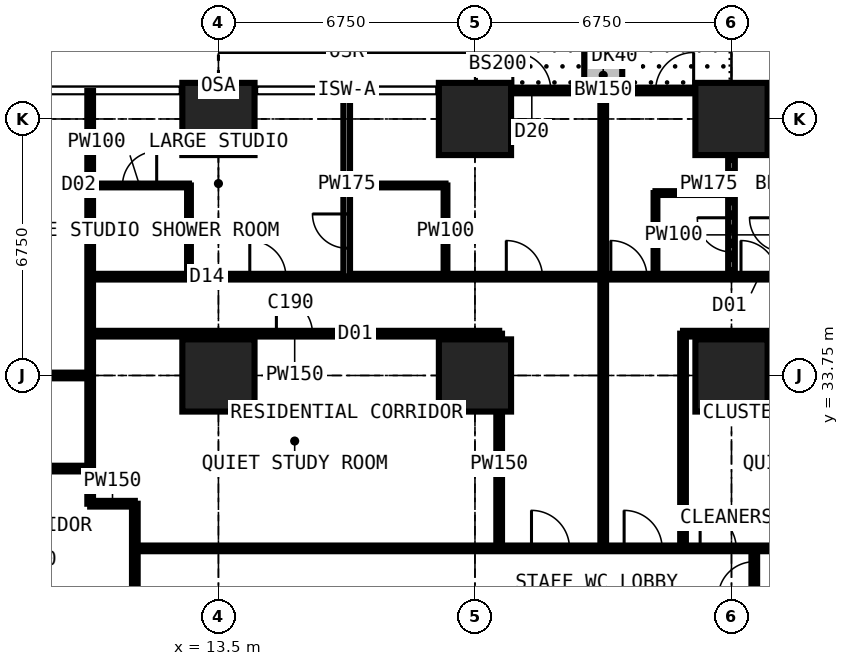
"""IFC4 building model, lengths in metres.
Left out: names, types, materials, properties, quantities, classifications, styles, units other than length and angle.
Written with IfcOpenShell. Run it as: python <this file> out.ifc"""

import sys

from ifc_helpers import new_model, si_unit, direction, frame, frame_2d, origin, origin_2d, place, context, subcontext, project, spatial, rectangle, extrude, element, fill, save


model = new_model("IFC4")
c1 = context("Model", 3, precision=1e-05, world=origin(), true_north=direction((0.0, 1.0)))
c2 = subcontext(c1, "Body", "Model", "MODEL_VIEW")
j1 = project(units=[si_unit("LENGTHUNIT", "METRE"), si_unit("PLANEANGLEUNIT", "RADIAN")], contexts=[c1])
p1 = place(None, origin())
s1 = spatial("IfcSite", under=j1, at=p1, CompositionType="ELEMENT")
p2 = place(p1, origin())
s2 = spatial("IfcBuilding", under=s1, at=p2, CompositionType="ELEMENT")
p3 = place(p2, frame((0.0, 0.0, 43.2)))
s3 = spatial("IfcBuildingStorey", under=s2, at=p3, CompositionType="ELEMENT", Elevation=43.2)
for number, where, z_axis, x_axis in (
    (1, (13.5, 33.75, 0.0), (0.0, 0.0, 1.0), (1.0, 0.0, 0.0)),
    (2, (13.5, 40.5, 0.0), (0.0, 0.0, 1.0), (1.0, 0.0, 0.0)),
    (3, (20.25, 33.75, 0.0), (0.0, 0.0, 1.0), (1.0, 0.0, 0.0)),
    (4, (20.25, 40.5, 0.0), (0.0, 0.0, 1.0), (1.0, 0.0, 0.0)),
    (5, (27.0, 33.75, 0.0), (0.0, 0.0, 1.0), (1.0, 0.0, 0.0)),
    (6, (27.0, 40.5, 0.0), (0.0, 0.0, 1.0), (1.0, 0.0, 0.0)),
):
    element("IfcColumn", number, at=place(p3, frame(where, z_axis=z_axis, x_axis=x_axis)), inside=s3, PredefinedType="COLUMN", context=c2, shape_type="SweptSolid", body=[
        extrude(rectangle(XDim=1.9, YDim=1.9, at=origin_2d()), origin(), (0.0, 0.0, 1.0), 3.6),
    ])
p4 = place(p3, frame((20.25, 41.25, 0.0), z_axis=(0.0, 0.0, 1.0), x_axis=(1.0, 0.0, 0.0)))
e7 = element("IfcWall", 7, at=p4, inside=s3, PredefinedType="SOLIDWALL", context=c2, shape_type="SweptSolid", body=[
    extrude(rectangle(XDim=6.75, YDim=0.15, at=frame_2d((3.375, 0.0))), origin(), (0.0, 0.0, 1.0), 3.375),
])
p5 = place(p4, frame((0.996, 0.0, 0.0)))
e8 = element("IfcOpeningElement", 8, at=p5, cuts=e7, PredefinedType="OPENING", context=c2, shape_type="SweptSolid", body=[
    extrude(rectangle(XDim=1.0, YDim=2.2, at=frame_2d((0.5, 1.1))), frame((0.0, 0.085, 0.0), z_axis=(0.0, -1.0, 0.0), x_axis=(1.0, 0.0, 0.0)), (0.0, 0.0, 1.0), 0.17),
])
p6 = place(p4, frame((2.042, 0.0, 0.9)))
e9 = element("IfcOpeningElement", 9, at=p6, cuts=e7, PredefinedType="OPENING", context=c2, shape_type="SweptSolid", body=[
    extrude(rectangle(XDim=1.2, YDim=1.8, at=frame_2d((0.6, 0.9))), frame((0.0, 0.085, 0.0), z_axis=(0.0, -1.0, 0.0), x_axis=(1.0, 0.0, 0.0)), (0.0, 0.0, 1.0), 0.17),
])
p7 = place(p4, frame((4.754, 0.0, 0.0)))
e10 = element("IfcOpeningElement", 10, at=p7, cuts=e7, PredefinedType="OPENING", context=c2, shape_type="SweptSolid", body=[
    extrude(rectangle(XDim=1.0, YDim=2.2, at=frame_2d((0.5, 1.1))), frame((0.0, 0.085, 0.0), z_axis=(0.0, -1.0, 0.0), x_axis=(1.0, 0.0, 0.0)), (0.0, 0.0, 1.0), 0.17),
])
p8 = place(p4, frame((3.508, 0.0, 0.9)))
e11 = element("IfcOpeningElement", 11, at=p8, cuts=e7, PredefinedType="OPENING", context=c2, shape_type="SweptSolid", body=[
    extrude(rectangle(XDim=1.2, YDim=1.8, at=frame_2d((0.6, 0.9))), frame((0.0, 0.085, 0.0), z_axis=(0.0, -1.0, 0.0), x_axis=(1.0, 0.0, 0.0)), (0.0, 0.0, 1.0), 0.17),
])
p9 = place(p3, frame((23.625, 41.35, 0.0), z_axis=(0.0, 0.0, 1.0), x_axis=(0.0, 1.0, 0.0)))
e12 = element("IfcWall", 12, at=p9, inside=s3, PredefinedType="USERDEFINED", context=c2, shape_type="SweptSolid", body=[
    extrude(rectangle(XDim=2.2, YDim=1.0, at=frame_2d((1.1, 0.0))), origin(), (0.0, 0.0, 1.0), 0.9),
])
p10 = place(p3, frame((-0.734, 33.75, 0.0), z_axis=(0.0, 0.0, 1.0), x_axis=(1.0, 0.0, 0.0)))
e13 = element("IfcWall", 13, at=p10, inside=s3, PredefinedType="PARTITIONING", context=c2, shape_type="SweptSolid", body=[
    extrude(rectangle(XDim=10.859, YDim=0.15, at=frame_2d((5.429, 0.0))), origin(), (0.0, 0.0, 1.0), 2.877),
])
p11 = place(p10, frame((8.434, 0.0, 0.0)))
e14 = element("IfcOpeningElement", 14, at=p11, cuts=e13, PredefinedType="OPENING", context=c2, shape_type="SweptSolid", body=[
    extrude(rectangle(XDim=1.0, YDim=2.2, at=frame_2d((0.5, 1.1))), frame((0.0, 0.085, 0.0), z_axis=(0.0, -1.0, 0.0), x_axis=(1.0, 0.0, 0.0)), (0.0, 0.0, 1.0), 0.17),
])
p12 = place(p3, frame((5.65, 31.3, 0.0), z_axis=(0.0, 0.0, 1.0), x_axis=(1.0, 0.0, 0.0)))
e15 = element("IfcWall", 15, at=p12, inside=s3, PredefinedType="PARTITIONING", context=c2, shape_type="SweptSolid", body=[
    extrude(rectangle(XDim=4.475, YDim=0.15, at=frame_2d((2.238, 0.0))), origin(), (0.0, 0.0, 1.0), 3.375),
])
p13 = place(p3, frame((10.125, 30.375, 0.0), z_axis=(0.0, 0.0, 1.0), x_axis=(0.0, 1.0, 0.0)))
e16 = element("IfcWall", 16, at=p13, inside=s3, PredefinedType="PARTITIONING", context=c2, shape_type="SweptSolid", body=[
    extrude(rectangle(XDim=10.859, YDim=0.15, at=frame_2d((5.429, 0.0))), origin(), (0.0, 0.0, 1.0), 3.375),
])
p14 = place(p3, frame((10.125, 30.375, 0.0), z_axis=(0.0, 0.0, 1.0), x_axis=(1.0, 0.0, 0.0)))
e17 = element("IfcWall", 17, at=p14, inside=s3, PredefinedType="PARTITIONING", context=c2, shape_type="SweptSolid", body=[
    extrude(rectangle(XDim=1.175, YDim=0.15, at=frame_2d((0.587, 0.0))), origin(), (0.0, 0.0, 1.0), 3.375),
])
p15 = place(p3, frame((10.125, 34.85, 0.0), z_axis=(0.0, 0.0, 1.0), x_axis=(1.0, 0.0, 0.0)))
e18 = element("IfcWall", 18, at=p15, inside=s3, PredefinedType="PARTITIONING", context=c2, shape_type="SweptSolid", body=[
    extrude(rectangle(XDim=10.762, YDim=0.15, at=frame_2d((5.381, 0.0))), origin(), (0.0, 0.0, 1.0), 3.375),
])
p16 = place(p15, frame((4.9, 0.0, 0.0)))
e19 = element("IfcOpeningElement", 19, at=p16, cuts=e18, PredefinedType="OPENING", context=c2, shape_type="SweptSolid", body=[
    extrude(rectangle(XDim=0.95, YDim=2.2, at=frame_2d((0.475, 1.1))), frame((0.0, 0.085, 0.0), z_axis=(0.0, -1.0, 0.0), x_axis=(1.0, 0.0, 0.0)), (0.0, 0.0, 1.0), 0.17),
])
p17 = place(p3, frame((10.125, 36.35, 0.0), z_axis=(0.0, 0.0, 1.0), x_axis=(1.0, 0.0, 0.0)))
e20 = element("IfcWall", 20, at=p17, inside=s3, PredefinedType="PARTITIONING", context=c2, shape_type="SweptSolid", body=[
    extrude(rectangle(XDim=23.625, YDim=0.15, at=frame_2d((11.812, 0.0))), origin(), (0.0, 0.0, 1.0), 3.375),
])
p18 = place(p17, frame((21.45, 0.0, 0.0)))
e21 = element("IfcOpeningElement", 21, at=p18, cuts=e20, PredefinedType="OPENING", context=c2, shape_type="SweptSolid", body=[
    extrude(rectangle(XDim=1.0, YDim=2.2, at=frame_2d((0.5, 1.1))), frame((0.0, 0.085, 0.0), z_axis=(0.0, -1.0, 0.0), x_axis=(1.0, 0.0, 0.0)), (0.0, 0.0, 1.0), 0.17),
])
p19 = place(p17, frame((17.125, 0.0, 0.0)))
e22 = element("IfcOpeningElement", 22, at=p19, cuts=e20, PredefinedType="OPENING", context=c2, shape_type="SweptSolid", body=[
    extrude(rectangle(XDim=0.95, YDim=2.2, at=frame_2d((0.475, 1.1))), frame((0.0, 0.085, 0.0), z_axis=(0.0, -1.0, 0.0), x_axis=(1.0, 0.0, 0.0)), (0.0, 0.0, 1.0), 0.17),
])
p20 = place(p17, frame((13.7, 0.0, 0.0)))
e23 = element("IfcOpeningElement", 23, at=p20, cuts=e20, PredefinedType="OPENING", context=c2, shape_type="SweptSolid", body=[
    extrude(rectangle(XDim=0.95, YDim=2.2, at=frame_2d((0.475, 1.1))), frame((0.0, 0.085, 0.0), z_axis=(0.0, -1.0, 0.0), x_axis=(1.0, 0.0, 0.0)), (0.0, 0.0, 1.0), 0.17),
])
p21 = place(p17, frame((4.2, 0.0, 0.0)))
e24 = element("IfcOpeningElement", 24, at=p21, cuts=e20, PredefinedType="OPENING", context=c2, shape_type="SweptSolid", body=[
    extrude(rectangle(XDim=0.95, YDim=2.2, at=frame_2d((0.475, 1.1))), frame((0.0, 0.085, 0.0), z_axis=(0.0, -1.0, 0.0), x_axis=(1.0, 0.0, 0.0)), (0.0, 0.0, 1.0), 0.17),
])
p22 = place(p17, frame((10.95, 0.0, 0.0)))
e25 = element("IfcOpeningElement", 25, at=p22, cuts=e20, PredefinedType="OPENING", context=c2, shape_type="SweptSolid", body=[
    extrude(rectangle(XDim=0.95, YDim=2.2, at=frame_2d((0.475, 1.1))), frame((0.0, 0.085, 0.0), z_axis=(0.0, -1.0, 0.0), x_axis=(1.0, 0.0, 0.0)), (0.0, 0.0, 1.0), 0.17),
])
p23 = place(p3, frame((10.125, 38.75, 0.0), z_axis=(0.0, 0.0, 1.0), x_axis=(1.0, 0.0, 0.0)))
e26 = element("IfcWall", 26, at=p23, inside=s3, PredefinedType="PARTITIONING", context=c2, shape_type="SweptSolid", body=[
    extrude(rectangle(XDim=2.6, YDim=0.1, at=frame_2d((1.3, 0.0))), origin(), (0.0, 0.0, 1.0), 3.375),
])
p24 = place(p23, frame((0.85, 0.0, 0.0)))
e27 = element("IfcOpeningElement", 27, at=p24, cuts=e26, PredefinedType="OPENING", context=c2, shape_type="SweptSolid", body=[
    extrude(rectangle(XDim=0.9, YDim=2.2, at=frame_2d((0.45, 1.1))), frame((0.0, 0.06, 0.0), z_axis=(0.0, -1.0, 0.0), x_axis=(1.0, 0.0, 0.0)), (0.0, 0.0, 1.0), 0.12),
])
p25 = place(p3, frame((11.3, 11.3, 0.0), z_axis=(0.0, 0.0, 1.0), x_axis=(0.0, 1.0, 0.0)))
e28 = element("IfcWall", 28, at=p25, inside=s3, PredefinedType="PARTITIONING", context=c2, shape_type="SweptSolid", body=[
    extrude(rectangle(XDim=19.075, YDim=0.15, at=frame_2d((9.538, 0.0))), origin(), (0.0, 0.0, 1.0), 3.375),
])
p26 = place(p25, frame((12.875, 0.0, 0.0)))
e29 = element("IfcOpeningElement", 29, at=p26, cuts=e28, PredefinedType="OPENING", context=c2, shape_type="SweptSolid", body=[
    extrude(rectangle(XDim=1.0, YDim=2.2, at=frame_2d((0.5, 1.1))), frame((0.0, 0.085, 0.0), z_axis=(0.0, -1.0, 0.0), x_axis=(1.0, 0.0, 0.0)), (0.0, 0.0, 1.0), 0.17),
])
p27 = place(p25, frame((10.438, 0.0, 0.0)))
e30 = element("IfcOpeningElement", 30, at=p27, cuts=e28, PredefinedType="OPENING", context=c2, shape_type="SweptSolid", body=[
    extrude(rectangle(XDim=1.0, YDim=2.2, at=frame_2d((0.5, 1.1))), frame((0.0, 0.085, 0.0), z_axis=(0.0, -1.0, 0.0), x_axis=(1.0, 0.0, 0.0)), (0.0, 0.0, 1.0), 0.17),
])
p28 = place(p25, frame((15.675, 0.0, 0.0)))
e31 = element("IfcOpeningElement", 31, at=p28, cuts=e28, PredefinedType="OPENING", context=c2, shape_type="SweptSolid", body=[
    extrude(rectangle(XDim=0.95, YDim=2.2, at=frame_2d((0.475, 1.1))), frame((0.0, 0.085, 0.0), z_axis=(0.0, -1.0, 0.0), x_axis=(1.0, 0.0, 0.0)), (0.0, 0.0, 1.0), 0.17),
])
p29 = place(p3, frame((11.3, 29.2, 0.0), z_axis=(0.0, 0.0, 1.0), x_axis=(1.0, 0.0, 0.0)))
e32 = element("IfcWall", 32, at=p29, inside=s3, PredefinedType="PARTITIONING", context=c2, shape_type="SweptSolid", body=[
    extrude(rectangle(XDim=19.075, YDim=0.15, at=frame_2d((9.538, 0.0))), origin(), (0.0, 0.0, 1.0), 3.375),
])
p30 = place(p29, frame((12.875, 0.0, 0.0)))
e33 = element("IfcOpeningElement", 33, at=p30, cuts=e32, PredefinedType="OPENING", context=c2, shape_type="SweptSolid", body=[
    extrude(rectangle(XDim=1.0, YDim=2.2, at=frame_2d((0.5, 1.1))), frame((0.0, 0.085, 0.0), z_axis=(0.0, -1.0, 0.0), x_axis=(1.0, 0.0, 0.0)), (0.0, 0.0, 1.0), 0.17),
])
p31 = place(p29, frame((10.438, 0.0, 0.0)))
e34 = element("IfcOpeningElement", 34, at=p31, cuts=e32, PredefinedType="OPENING", context=c2, shape_type="SweptSolid", body=[
    extrude(rectangle(XDim=1.0, YDim=2.2, at=frame_2d((0.5, 1.1))), frame((0.0, 0.085, 0.0), z_axis=(0.0, -1.0, 0.0), x_axis=(1.0, 0.0, 0.0)), (0.0, 0.0, 1.0), 0.17),
])
p32 = place(p29, frame((14.875, 0.0, 0.0)))
e35 = element("IfcOpeningElement", 35, at=p32, cuts=e32, PredefinedType="OPENING", context=c2, shape_type="SweptSolid", body=[
    extrude(rectangle(XDim=0.95, YDim=2.2, at=frame_2d((0.475, 1.1))), frame((0.0, 0.085, 0.0), z_axis=(0.0, -1.0, 0.0), x_axis=(1.0, 0.0, 0.0)), (0.0, 0.0, 1.0), 0.17),
])
p33 = place(p3, frame((12.725, 36.35, 0.0), z_axis=(0.0, 0.0, 1.0), x_axis=(0.0, 1.0, 0.0)))
e36 = element("IfcWall", 36, at=p33, inside=s3, PredefinedType="PARTITIONING", context=c2, shape_type="SweptSolid", body=[
    extrude(rectangle(XDim=2.4, YDim=0.1, at=frame_2d((1.2, 0.0))), origin(), (0.0, 0.0, 1.0), 3.375),
])
p34 = place(p3, frame((16.875, 36.35, 0.0), z_axis=(0.0, 0.0, 1.0), x_axis=(0.0, 1.0, 0.0)))
e37 = element("IfcWall", 37, at=p34, inside=s3, PredefinedType="PARTITIONING", context=c2, shape_type="SweptSolid", body=[
    extrude(rectangle(XDim=4.884, YDim=0.175, at=frame_2d((2.442, 0.0))), origin(), (0.0, 0.0, 1.0), 3.375),
])
p35 = place(p34, frame((0.75, 0.0, 0.0)))
e38 = element("IfcOpeningElement", 38, at=p35, cuts=e37, PredefinedType="OPENING", context=c2, shape_type="SweptSolid", body=[
    extrude(rectangle(XDim=0.9, YDim=2.2, at=frame_2d((0.45, 1.1))), frame((0.0, 0.097, 0.0), z_axis=(0.0, -1.0, 0.0), x_axis=(1.0, 0.0, 0.0)), (0.0, 0.0, 1.0), 0.195),
])
p36 = place(p3, frame((16.875, 38.75, 0.0), z_axis=(0.0, 0.0, 1.0), x_axis=(1.0, 0.0, 0.0)))
e39 = element("IfcWall", 39, at=p36, inside=s3, PredefinedType="PARTITIONING", context=c2, shape_type="SweptSolid", body=[
    extrude(rectangle(XDim=2.6, YDim=0.1, at=frame_2d((1.3, 0.0))), origin(), (0.0, 0.0, 1.0), 3.375),
])
p37 = place(p3, frame((19.475, 36.35, 0.0), z_axis=(0.0, 0.0, 1.0), x_axis=(0.0, 1.0, 0.0)))
e40 = element("IfcWall", 40, at=p37, inside=s3, PredefinedType="PARTITIONING", context=c2, shape_type="SweptSolid", body=[
    extrude(rectangle(XDim=2.4, YDim=0.1, at=frame_2d((1.2, 0.0))), origin(), (0.0, 0.0, 1.0), 3.375),
])
p38 = place(p3, frame((20.887, 29.2, 0.0), z_axis=(0.0, 0.0, 1.0), x_axis=(0.0, 1.0, 0.0)))
e41 = element("IfcWall", 41, at=p38, inside=s3, PredefinedType="PARTITIONING", context=c2, shape_type="SweptSolid", body=[
    extrude(rectangle(XDim=5.65, YDim=0.15, at=frame_2d((2.825, 0.0))), origin(), (0.0, 0.0, 1.0), 3.375),
])
p39 = place(p3, frame((23.625, 29.2, 0.0), z_axis=(0.0, 0.0, 1.0), x_axis=(0.0, 1.0, 0.0)))
e42 = element("IfcWall", 42, at=p39, inside=s3, PredefinedType="PARTITIONING", context=c2, shape_type="SweptSolid", body=[
    extrude(rectangle(XDim=12.034, YDim=0.15, at=frame_2d((6.017, 0.0))), origin(), (0.0, 0.0, 1.0), 3.375),
])
p40 = place(p3, frame((25.0, 36.35, 0.0), z_axis=(0.0, 0.0, 1.0), x_axis=(0.0, 1.0, 0.0)))
e43 = element("IfcWall", 43, at=p40, inside=s3, PredefinedType="PARTITIONING", context=c2, shape_type="SweptSolid", body=[
    extrude(rectangle(XDim=2.2, YDim=0.1, at=frame_2d((1.1, 0.0))), origin(), (0.0, 0.0, 1.0), 3.375),
])
p41 = place(p3, frame((25.0, 38.55, 0.0), z_axis=(0.0, 0.0, 1.0), x_axis=(1.0, 0.0, 0.0)))
e44 = element("IfcWall", 44, at=p41, inside=s3, PredefinedType="PARTITIONING", context=c2, shape_type="SweptSolid", body=[
    extrude(rectangle(XDim=2.0, YDim=0.1, at=frame_2d((1.0, 0.0))), origin(), (0.0, 0.0, 1.0), 3.375),
])
p42 = place(p3, frame((25.725, 29.2, 0.0), z_axis=(0.0, 0.0, 1.0), x_axis=(0.0, 1.0, 0.0)))
e45 = element("IfcWall", 45, at=p42, inside=s3, PredefinedType="PARTITIONING", context=c2, shape_type="SweptSolid", body=[
    extrude(rectangle(XDim=5.65, YDim=0.15, at=frame_2d((2.825, 0.0))), origin(), (0.0, 0.0, 1.0), 3.375),
])
p43 = place(p3, frame((25.725, 34.85, 0.0), z_axis=(0.0, 0.0, 1.0), x_axis=(1.0, 0.0, 0.0)))
e46 = element("IfcWall", 46, at=p43, inside=s3, PredefinedType="PARTITIONING", context=c2, shape_type="SweptSolid", body=[
    extrude(rectangle(XDim=8.025, YDim=0.15, at=frame_2d((4.012, 0.0))), origin(), (0.0, 0.0, 1.0), 3.375),
])
p44 = place(p3, frame((27.0, 36.35, 0.0), z_axis=(0.0, 0.0, 1.0), x_axis=(0.0, 1.0, 0.0)))
e47 = element("IfcWall", 47, at=p44, inside=s3, PredefinedType="PARTITIONING", context=c2, shape_type="SweptSolid", body=[
    extrude(rectangle(XDim=4.884, YDim=0.175, at=frame_2d((2.442, 0.0))), origin(), (0.0, 0.0, 1.0), 2.61),
])
p45 = place(p44, frame((0.65, 0.0, 0.0)))
e48 = element("IfcOpeningElement", 48, at=p45, cuts=e47, PredefinedType="OPENING", context=c2, shape_type="SweptSolid", body=[
    extrude(rectangle(XDim=0.9, YDim=2.2, at=frame_2d((0.45, 1.1))), frame((0.0, 0.097, 0.0), z_axis=(0.0, -1.0, 0.0), x_axis=(1.0, 0.0, 0.0)), (0.0, 0.0, 1.0), 0.195),
])
p46 = place(p3, frame((27.6, 27.6, 0.0), z_axis=(0.0, 0.0, 1.0), x_axis=(0.0, 1.0, 0.0)))
e49 = element("IfcWall", 49, at=p46, inside=s3, PredefinedType="PARTITIONING", context=c2, shape_type="SweptSolid", body=[
    extrude(rectangle(XDim=1.6, YDim=0.15, at=frame_2d((0.8, 0.0))), origin(), (0.0, 0.0, 1.0), 3.375),
])
p47 = place(p46, frame((0.3, 0.0, 0.0)))
e50 = element("IfcOpeningElement", 50, at=p47, cuts=e49, PredefinedType="OPENING", context=c2, shape_type="SweptSolid", body=[
    extrude(rectangle(XDim=0.95, YDim=2.2, at=frame_2d((0.475, 1.1))), frame((0.0, 0.085, 0.0), z_axis=(0.0, -1.0, 0.0), x_axis=(1.0, 0.0, 0.0)), (0.0, 0.0, 1.0), 0.17),
])
p48 = place(p5, origin())
e51 = element("IfcDoor", 51, at=p48, inside=s3, OperationType="SINGLE_SWING_LEFT", PredefinedType="DOOR", context=c2, shape_type="SweptSolid", body=[
    extrude(rectangle(XDim=1.0, YDim=2.2, at=frame_2d((0.5, 1.1))), frame((0.0, 0.025, 0.0), z_axis=(0.0, -1.0, 0.0), x_axis=(1.0, 0.0, 0.0)), (0.0, 0.0, 1.0), 0.05),
])
fill(e8, e51)
p49 = place(p6, origin())
e52 = element("IfcWindow", 52, at=p49, inside=s3, PartitioningType="SINGLE_PANEL", PredefinedType="WINDOW", context=c2, shape_type="SweptSolid", body=[
    extrude(rectangle(XDim=1.2, YDim=1.8, at=frame_2d((0.6, 0.9))), frame((0.0, 0.03, 0.0), z_axis=(0.0, -1.0, 0.0), x_axis=(1.0, 0.0, 0.0)), (0.0, 0.0, 1.0), 0.06),
])
fill(e9, e52)
p50 = place(p7, origin())
e53 = element("IfcDoor", 53, at=p50, inside=s3, OperationType="SINGLE_SWING_RIGHT", PredefinedType="DOOR", context=c2, shape_type="SweptSolid", body=[
    extrude(rectangle(XDim=1.0, YDim=2.2, at=frame_2d((0.5, 1.1))), frame((0.0, 0.025, 0.0), z_axis=(0.0, -1.0, 0.0), x_axis=(1.0, 0.0, 0.0)), (0.0, 0.0, 1.0), 0.05),
])
fill(e10, e53)
p51 = place(p8, origin())
e54 = element("IfcWindow", 54, at=p51, inside=s3, PartitioningType="SINGLE_PANEL", PredefinedType="WINDOW", context=c2, shape_type="SweptSolid", body=[
    extrude(rectangle(XDim=1.2, YDim=1.8, at=frame_2d((0.6, 0.9))), frame((0.0, 0.03, 0.0), z_axis=(0.0, -1.0, 0.0), x_axis=(1.0, 0.0, 0.0)), (0.0, 0.0, 1.0), 0.06),
])
fill(e11, e54)
p52 = place(p47, origin())
e55 = element("IfcDoor", 55, at=p52, inside=s3, OperationType="SINGLE_SWING_LEFT", PredefinedType="DOOR", context=c2, shape_type="SweptSolid", body=[
    extrude(rectangle(XDim=0.95, YDim=2.2, at=frame_2d((0.475, 1.1))), frame((0.0, 0.025, 0.0), z_axis=(0.0, -1.0, 0.0), x_axis=(1.0, 0.0, 0.0)), (0.0, 0.0, 1.0), 0.05),
])
fill(e50, e55)
p53 = place(p19, origin())
e56 = element("IfcDoor", 56, at=p53, inside=s3, OperationType="SINGLE_SWING_LEFT", PredefinedType="DOOR", context=c2, shape_type="SweptSolid", body=[
    extrude(rectangle(XDim=0.95, YDim=2.2, at=frame_2d((0.475, 1.1))), frame((0.0, 0.025, 0.0), z_axis=(0.0, -1.0, 0.0), x_axis=(1.0, 0.0, 0.0)), (0.0, 0.0, 1.0), 0.05),
])
fill(e22, e56)
p54 = place(p20, origin())
e57 = element("IfcDoor", 57, at=p54, inside=s3, OperationType="SINGLE_SWING_LEFT", PredefinedType="DOOR", context=c2, shape_type="SweptSolid", body=[
    extrude(rectangle(XDim=0.95, YDim=2.2, at=frame_2d((0.475, 1.1))), frame((0.0, 0.025, 0.0), z_axis=(0.0, -1.0, 0.0), x_axis=(1.0, 0.0, 0.0)), (0.0, 0.0, 1.0), 0.05),
])
fill(e23, e57)
p55 = place(p45, origin())
e58 = element("IfcDoor", 58, at=p55, inside=s3, OperationType="SINGLE_SWING_RIGHT", PredefinedType="DOOR", context=c2, shape_type="SweptSolid", body=[
    extrude(rectangle(XDim=0.9, YDim=2.2, at=frame_2d((0.45, 1.1))), frame((0.0, 0.025, 0.0), z_axis=(0.0, -1.0, 0.0), x_axis=(1.0, 0.0, 0.0)), (0.0, 0.0, 1.0), 0.05),
])
fill(e48, e58)
p56 = place(p30, origin())
e59 = element("IfcDoor", 59, at=p56, inside=s3, OperationType="SINGLE_SWING_LEFT", PredefinedType="DOOR", context=c2, shape_type="SweptSolid", body=[
    extrude(rectangle(XDim=1.0, YDim=2.2, at=frame_2d((0.5, 1.1))), frame((0.0, 0.025, 0.0), z_axis=(0.0, -1.0, 0.0), x_axis=(1.0, 0.0, 0.0)), (0.0, 0.0, 1.0), 0.05),
])
fill(e33, e59)
p57 = place(p21, origin())
e60 = element("IfcDoor", 60, at=p57, inside=s3, OperationType="SINGLE_SWING_LEFT", PredefinedType="DOOR", context=c2, shape_type="SweptSolid", body=[
    extrude(rectangle(XDim=0.95, YDim=2.2, at=frame_2d((0.475, 1.1))), frame((0.0, 0.025, 0.0), z_axis=(0.0, -1.0, 0.0), x_axis=(1.0, 0.0, 0.0)), (0.0, 0.0, 1.0), 0.05),
])
fill(e24, e60)
p58 = place(p24, origin())
e61 = element("IfcDoor", 61, at=p58, inside=s3, OperationType="SINGLE_SWING_RIGHT", PredefinedType="DOOR", context=c2, shape_type="SweptSolid", body=[
    extrude(rectangle(XDim=0.9, YDim=2.2, at=frame_2d((0.45, 1.1))), frame((0.0, 0.025, 0.0), z_axis=(0.0, -1.0, 0.0), x_axis=(1.0, 0.0, 0.0)), (0.0, 0.0, 1.0), 0.05),
])
fill(e27, e61)
p59 = place(p22, origin())
e62 = element("IfcDoor", 62, at=p59, inside=s3, OperationType="SINGLE_SWING_LEFT", PredefinedType="DOOR", context=c2, shape_type="SweptSolid", body=[
    extrude(rectangle(XDim=0.95, YDim=2.2, at=frame_2d((0.475, 1.1))), frame((0.0, 0.025, 0.0), z_axis=(0.0, -1.0, 0.0), x_axis=(1.0, 0.0, 0.0)), (0.0, 0.0, 1.0), 0.05),
])
fill(e25, e62)
p60 = place(p35, origin())
e63 = element("IfcDoor", 63, at=p60, inside=s3, OperationType="SINGLE_SWING_RIGHT", PredefinedType="DOOR", context=c2, shape_type="SweptSolid", body=[
    extrude(rectangle(XDim=0.9, YDim=2.2, at=frame_2d((0.45, 1.1))), frame((0.0, 0.025, 0.0), z_axis=(0.0, -1.0, 0.0), x_axis=(1.0, 0.0, 0.0)), (0.0, 0.0, 1.0), 0.05),
])
fill(e38, e63)
p61 = place(p31, origin())
e64 = element("IfcDoor", 64, at=p61, inside=s3, OperationType="SINGLE_SWING_LEFT", PredefinedType="DOOR", context=c2, shape_type="SweptSolid", body=[
    extrude(rectangle(XDim=1.0, YDim=2.2, at=frame_2d((0.5, 1.1))), frame((0.0, 0.025, 0.0), z_axis=(0.0, -1.0, 0.0), x_axis=(1.0, 0.0, 0.0)), (0.0, 0.0, 1.0), 0.05),
])
fill(e34, e64)
p62 = place(p32, origin())
e65 = element("IfcDoor", 65, at=p62, inside=s3, OperationType="SINGLE_SWING_LEFT", PredefinedType="DOOR", context=c2, shape_type="SweptSolid", body=[
    extrude(rectangle(XDim=0.95, YDim=2.2, at=frame_2d((0.475, 1.1))), frame((0.0, 0.025, 0.0), z_axis=(0.0, -1.0, 0.0), x_axis=(1.0, 0.0, 0.0)), (0.0, 0.0, 1.0), 0.05),
])
fill(e35, e65)
p63 = place(p16, origin())
e66 = element("IfcDoor", 66, at=p63, inside=s3, OperationType="SINGLE_SWING_LEFT", PredefinedType="DOOR", context=c2, shape_type="SweptSolid", body=[
    extrude(rectangle(XDim=0.95, YDim=2.2, at=frame_2d((0.475, 1.1))), frame((0.0, 0.025, 0.0), z_axis=(0.0, -1.0, 0.0), x_axis=(1.0, 0.0, 0.0)), (0.0, 0.0, 1.0), 0.05),
])
fill(e19, e66)
save(model, sys.argv[1])
